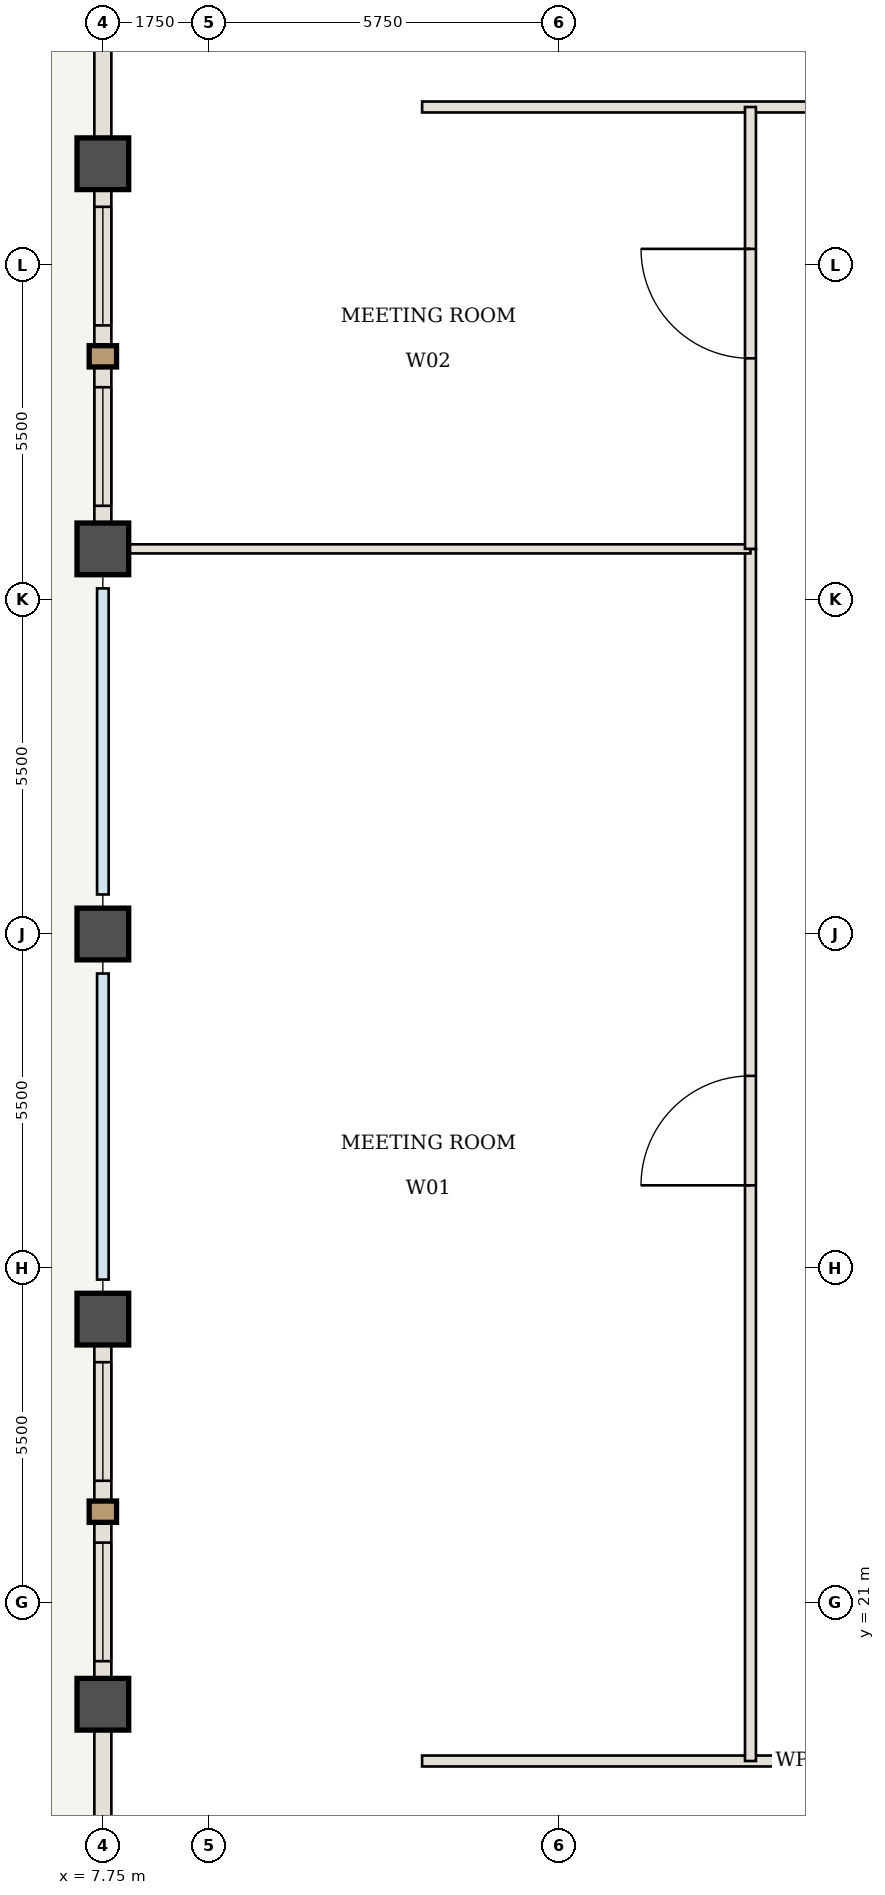
"""IFC4 building model, lengths in metres.
Left out: names, types, materials, properties, quantities, classifications, styles, units other than length and angle.
Written with IfcOpenShell. Run it as: python <this file> out.ifc"""

import sys

from ifc_helpers import new_model, si_unit, direction, frame, frame_2d, origin, origin_2d, place, context, subcontext, project, spatial, rectangle, extrude, element, fill, save


model = new_model("IFC4")
c1 = context("Model", 3, precision=1e-05, world=origin(), true_north=direction((0.0, 1.0)))
c2 = subcontext(c1, "Body", "Model", "MODEL_VIEW")
j1 = project(units=[si_unit("LENGTHUNIT", "METRE"), si_unit("PLANEANGLEUNIT", "RADIAN")], contexts=[c1])
p1 = place(None, origin())
s1 = spatial("IfcSite", under=j1, at=p1, CompositionType="ELEMENT")
p2 = place(p1, origin())
s2 = spatial("IfcBuilding", under=s1, at=p2, CompositionType="ELEMENT")
p3 = place(p2, frame((0.0, 0.0, 182.35)))
s3 = spatial("IfcBuildingStorey", under=s2, at=p3, CompositionType="ELEMENT", Elevation=182.35)
for number, where, z_axis, x_axis in (
    (1, (7.75, 19.333, -0.42), (0.0, 0.0, 1.0), (1.0, 0.0, 0.0)),
    (2, (7.75, 25.667, -0.42), (0.0, 0.0, 1.0), (1.0, 0.0, 0.0)),
    (3, (7.75, 32.0, -0.42), (0.0, 0.0, 1.0), (1.0, 0.0, 0.0)),
    (4, (7.75, 38.333, -0.42), (0.0, 0.0, 1.0), (1.0, 0.0, 0.0)),
    (5, (7.75, 44.667, -0.42), (0.0, 0.0, 1.0), (1.0, 0.0, 0.0)),
):
    element("IfcColumn", number, at=place(p3, frame(where, z_axis=z_axis, x_axis=x_axis)), inside=s3, PredefinedType="COLUMN", context=c2, shape_type="SweptSolid", body=[
        extrude(rectangle(XDim=0.85, YDim=0.85, at=origin_2d()), origin(), (0.0, 0.0, 1.0), 4.97),
    ])
p4 = place(p3, frame((13.0, 18.4, 0.0), z_axis=(0.0, 0.0, 1.0), x_axis=(1.0, 0.0, 0.0)))
e6 = element("IfcWall", 6, at=p4, inside=s3, PredefinedType="STANDARD", context=c2, shape_type="SweptSolid", body=[
    extrude(rectangle(XDim=12.667, YDim=0.18, at=frame_2d((6.333, 0.0))), origin(), (0.0, 0.0, 1.0), 4.13),
])
p5 = place(p4, frame((9.983, 0.0, 0.0)))
e7 = element("IfcOpeningElement", 7, at=p5, cuts=e6, PredefinedType="OPENING", context=c2, shape_type="SweptSolid", body=[
    extrude(rectangle(XDim=1.8, YDim=2.35, at=frame_2d((0.9, 1.175))), frame((0.0, 0.1, 0.0), z_axis=(0.0, -1.0, 0.0), x_axis=(1.0, 0.0, 0.0)), (0.0, 0.0, 1.0), 0.2),
])
p6 = place(p3, frame((13.0, 45.6, 0.0), z_axis=(0.0, 0.0, 1.0), x_axis=(1.0, 0.0, 0.0)))
e8 = element("IfcWall", 8, at=p6, inside=s3, PredefinedType="STANDARD", context=c2, shape_type="SweptSolid", body=[
    extrude(rectangle(XDim=12.667, YDim=0.18, at=frame_2d((6.333, 0.0))), origin(), (0.0, 0.0, 1.0), 4.13),
])
p7 = place(p6, frame((9.983, 0.0, 0.0)))
e9 = element("IfcOpeningElement", 9, at=p7, cuts=e8, PredefinedType="OPENING", context=c2, shape_type="SweptSolid", body=[
    extrude(rectangle(XDim=1.8, YDim=2.35, at=frame_2d((0.9, 1.175))), frame((0.0, 0.1, 0.0), z_axis=(0.0, -1.0, 0.0), x_axis=(1.0, 0.0, 0.0)), (0.0, 0.0, 1.0), 0.2),
])
p8 = place(p3, frame((18.4, 18.4, 0.0), z_axis=(0.0, 0.0, 1.0), x_axis=(0.0, 1.0, 0.0)))
e10 = element("IfcWall", 10, at=p8, inside=s3, PredefinedType="STANDARD", context=c2, shape_type="SweptSolid", body=[
    extrude(rectangle(XDim=19.933, YDim=0.18, at=frame_2d((9.967, 0.0))), origin(), (0.0, 0.0, 1.0), 4.13),
])
p9 = place(p8, frame((9.467, 0.0, 0.0)))
e11 = element("IfcOpeningElement", 11, at=p9, cuts=e10, PredefinedType="OPENING", context=c2, shape_type="SweptSolid", body=[
    extrude(rectangle(XDim=1.8, YDim=2.35, at=frame_2d((0.9, 1.175))), frame((0.0, 0.1, 0.0), z_axis=(0.0, -1.0, 0.0), x_axis=(1.0, 0.0, 0.0)), (0.0, 0.0, 1.0), 0.2),
])
p10 = place(p3, frame((7.81, 38.333, 0.0), z_axis=(0.0, 0.0, 1.0), x_axis=(1.0, 0.0, 0.0)))
e12 = element("IfcWall", 12, at=p10, inside=s3, PredefinedType="STANDARD", context=c2, shape_type="SweptSolid", body=[
    extrude(rectangle(XDim=10.59, YDim=0.15, at=frame_2d((5.295, 0.0))), origin(), (0.0, 0.0, 1.0), 4.13),
])
p11 = place(p3, frame((18.4, 38.333, 0.0), z_axis=(0.0, 0.0, 1.0), x_axis=(0.0, 1.0, 0.0)))
e13 = element("IfcWall", 13, at=p11, inside=s3, PredefinedType="STANDARD", context=c2, shape_type="SweptSolid", body=[
    extrude(rectangle(XDim=7.267, YDim=0.18, at=frame_2d((3.633, 0.0))), origin(), (0.0, 0.0, 1.0), 4.13),
])
p12 = place(p11, frame((3.133, 0.0, 0.0)))
e14 = element("IfcOpeningElement", 14, at=p12, cuts=e13, PredefinedType="OPENING", context=c2, shape_type="SweptSolid", body=[
    extrude(rectangle(XDim=1.8, YDim=2.35, at=frame_2d((0.9, 1.175))), frame((0.0, 0.1, 0.0), z_axis=(0.0, -1.0, 0.0), x_axis=(1.0, 0.0, 0.0)), (0.0, 0.0, 1.0), 0.2),
])
p13 = place(p3, frame((7.75, 13.0, 0.0), z_axis=(0.0, 0.0, 1.0), x_axis=(0.0, 1.0, 0.0)))
e15 = element("IfcWall", 15, at=p13, inside=s3, PredefinedType="USERDEFINED", context=c2, shape_type="SweptSolid", body=[
    extrude(rectangle(XDim=6.333, YDim=0.28, at=frame_2d((3.167, 0.0))), origin(), (0.0, 0.0, 1.0), 3.43),
])
p14 = place(p3, frame((7.75, 19.333, 0.0), z_axis=(0.0, 0.0, 1.0), x_axis=(0.0, 1.0, 0.0)))
e16 = element("IfcWall", 16, at=p14, inside=s3, PredefinedType="USERDEFINED", context=c2, shape_type="SweptSolid", body=[
    extrude(rectangle(XDim=6.333, YDim=0.28, at=frame_2d((3.167, 0.0))), origin(), (0.0, 0.0, 1.0), 3.43),
])
p15 = place(p14, frame((0.708, 0.0, 0.85)))
e17 = element("IfcOpeningElement", 17, at=p15, cuts=e16, PredefinedType="OPENING", context=c2, shape_type="SweptSolid", body=[
    extrude(rectangle(XDim=1.95, YDim=2.2, at=frame_2d((0.975, 1.1))), frame((0.0, 0.15, 0.0), z_axis=(0.0, -1.0, 0.0), x_axis=(1.0, 0.0, 0.0)), (0.0, 0.0, 1.0), 0.3),
])
p16 = place(p14, frame((3.675, 0.0, 0.85)))
e18 = element("IfcOpeningElement", 18, at=p16, cuts=e16, PredefinedType="OPENING", context=c2, shape_type="SweptSolid", body=[
    extrude(rectangle(XDim=1.95, YDim=2.2, at=frame_2d((0.975, 1.1))), frame((0.0, 0.15, 0.0), z_axis=(0.0, -1.0, 0.0), x_axis=(1.0, 0.0, 0.0)), (0.0, 0.0, 1.0), 0.3),
])
p17 = place(p3, frame((7.75, 38.333, 0.0), z_axis=(0.0, 0.0, 1.0), x_axis=(0.0, 1.0, 0.0)))
e19 = element("IfcWall", 19, at=p17, inside=s3, PredefinedType="USERDEFINED", context=c2, shape_type="SweptSolid", body=[
    extrude(rectangle(XDim=6.333, YDim=0.28, at=frame_2d((3.167, 0.0))), origin(), (0.0, 0.0, 1.0), 3.43),
])
p18 = place(p17, frame((0.708, 0.0, 0.85)))
e20 = element("IfcOpeningElement", 20, at=p18, cuts=e19, PredefinedType="OPENING", context=c2, shape_type="SweptSolid", body=[
    extrude(rectangle(XDim=1.95, YDim=2.2, at=frame_2d((0.975, 1.1))), frame((0.0, 0.15, 0.0), z_axis=(0.0, -1.0, 0.0), x_axis=(1.0, 0.0, 0.0)), (0.0, 0.0, 1.0), 0.3),
])
p19 = place(p17, frame((3.675, 0.0, 0.85)))
e21 = element("IfcOpeningElement", 21, at=p19, cuts=e19, PredefinedType="OPENING", context=c2, shape_type="SweptSolid", body=[
    extrude(rectangle(XDim=1.95, YDim=2.2, at=frame_2d((0.975, 1.1))), frame((0.0, 0.15, 0.0), z_axis=(0.0, -1.0, 0.0), x_axis=(1.0, 0.0, 0.0)), (0.0, 0.0, 1.0), 0.3),
])
p20 = place(p3, frame((7.75, 44.667, 0.0), z_axis=(0.0, 0.0, 1.0), x_axis=(0.0, 1.0, 0.0)))
e22 = element("IfcWall", 22, at=p20, inside=s3, PredefinedType="USERDEFINED", context=c2, shape_type="SweptSolid", body=[
    extrude(rectangle(XDim=6.333, YDim=0.28, at=frame_2d((3.167, 0.0))), origin(), (0.0, 0.0, 1.0), 3.43),
])
p21 = place(p9, origin())
e23 = element("IfcDoor", 23, at=p21, inside=s3, OperationType="SINGLE_SWING_LEFT", PredefinedType="DOOR", context=c2, shape_type="SweptSolid", body=[
    extrude(rectangle(XDim=1.8, YDim=2.35, at=frame_2d((0.9, 1.175))), frame((0.0, 0.025, 0.0), z_axis=(0.0, -1.0, 0.0), x_axis=(1.0, 0.0, 0.0)), (0.0, 0.0, 1.0), 0.05),
])
fill(e11, e23)
p22 = place(p12, origin())
e24 = element("IfcDoor", 24, at=p22, inside=s3, OperationType="SINGLE_SWING_RIGHT", PredefinedType="DOOR", context=c2, shape_type="SweptSolid", body=[
    extrude(rectangle(XDim=1.8, YDim=2.35, at=frame_2d((0.9, 1.175))), frame((0.0, 0.025, 0.0), z_axis=(0.0, -1.0, 0.0), x_axis=(1.0, 0.0, 0.0)), (0.0, 0.0, 1.0), 0.05),
])
fill(e14, e24)
p23 = place(p15, origin())
e25 = element("IfcWindow", 25, at=p23, inside=s3, PartitioningType="SINGLE_PANEL", PredefinedType="WINDOW", context=c2, shape_type="SweptSolid", body=[
    extrude(rectangle(XDim=1.95, YDim=2.2, at=frame_2d((0.975, 1.1))), frame((0.0, 0.03, 0.0), z_axis=(0.0, -1.0, 0.0), x_axis=(1.0, 0.0, 0.0)), (0.0, 0.0, 1.0), 0.06),
])
fill(e17, e25)
p24 = place(p16, origin())
e26 = element("IfcWindow", 26, at=p24, inside=s3, PartitioningType="SINGLE_PANEL", PredefinedType="WINDOW", context=c2, shape_type="SweptSolid", body=[
    extrude(rectangle(XDim=1.95, YDim=2.2, at=frame_2d((0.975, 1.1))), frame((0.0, 0.03, 0.0), z_axis=(0.0, -1.0, 0.0), x_axis=(1.0, 0.0, 0.0)), (0.0, 0.0, 1.0), 0.06),
])
fill(e18, e26)
p25 = place(p18, origin())
e27 = element("IfcWindow", 27, at=p25, inside=s3, PartitioningType="SINGLE_PANEL", PredefinedType="WINDOW", context=c2, shape_type="SweptSolid", body=[
    extrude(rectangle(XDim=1.95, YDim=2.2, at=frame_2d((0.975, 1.1))), frame((0.0, 0.03, 0.0), z_axis=(0.0, -1.0, 0.0), x_axis=(1.0, 0.0, 0.0)), (0.0, 0.0, 1.0), 0.06),
])
fill(e20, e27)
p26 = place(p19, origin())
e28 = element("IfcWindow", 28, at=p26, inside=s3, PartitioningType="SINGLE_PANEL", PredefinedType="WINDOW", context=c2, shape_type="SweptSolid", body=[
    extrude(rectangle(XDim=1.95, YDim=2.2, at=frame_2d((0.975, 1.1))), frame((0.0, 0.03, 0.0), z_axis=(0.0, -1.0, 0.0), x_axis=(1.0, 0.0, 0.0)), (0.0, 0.0, 1.0), 0.06),
])
fill(e21, e28)
save(model, sys.argv[1])
